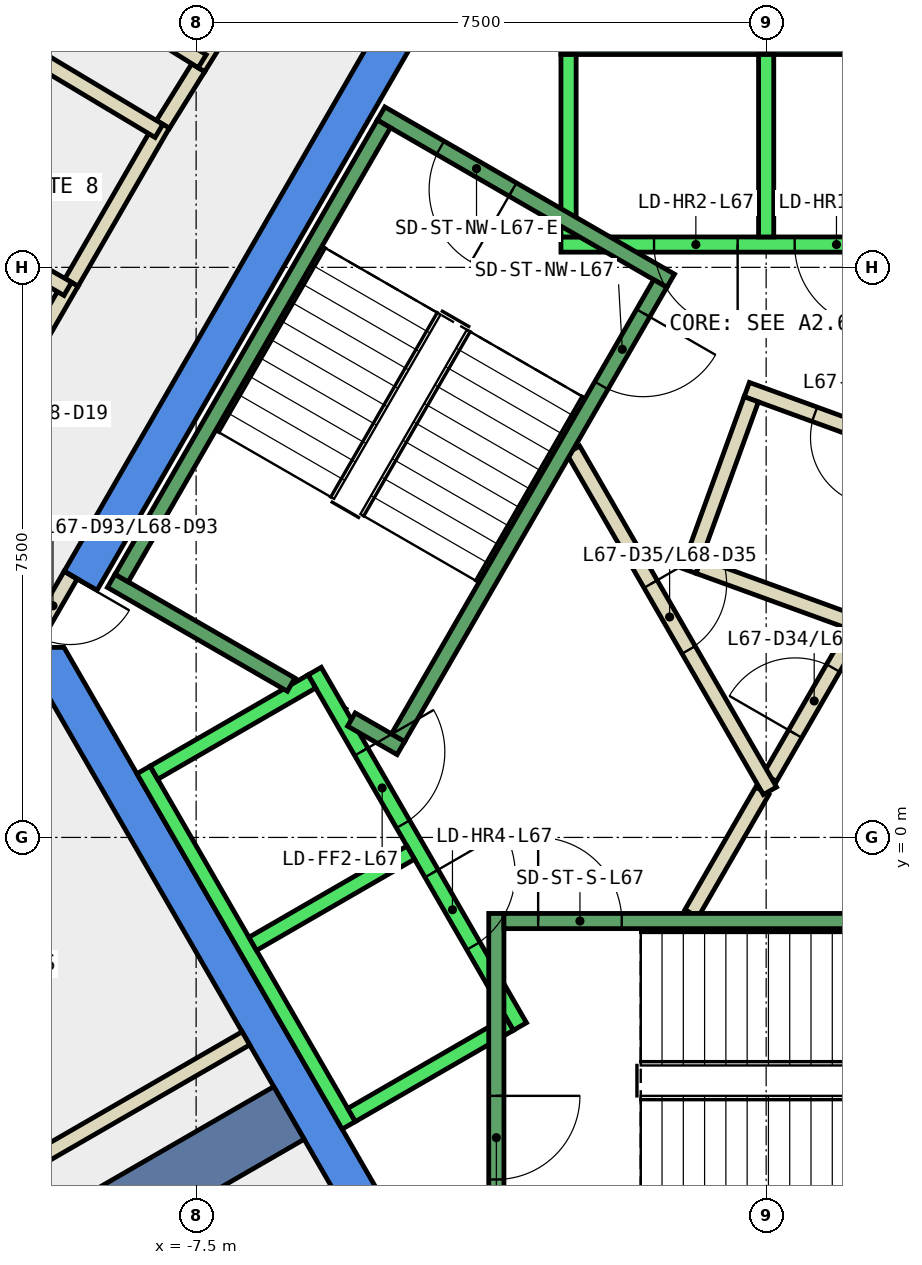
"""IFC4 building model, lengths in metres.
Left out: names, types, materials, properties, quantities, classifications, styles, units other than length and angle.
Written with IfcOpenShell. Run it as: python <this file> out.ifc"""

import sys

from ifc_helpers import new_model, si_unit, direction, frame, frame_2d, origin, place, context, subcontext, project, spatial, polyline, rectangle, outline, extrude, element, fill, save


model = new_model("IFC4")
c1 = context("Model", 3, precision=1e-05, world=origin(), true_north=direction((0.0, 1.0)))
c2 = subcontext(c1, "Body", "Model", "MODEL_VIEW")
j1 = project(units=[si_unit("LENGTHUNIT", "METRE"), si_unit("PLANEANGLEUNIT", "RADIAN")], contexts=[c1])
p1 = place(None, origin())
s1 = spatial("IfcSite", under=j1, at=p1, CompositionType="ELEMENT")
p2 = place(p1, origin())
s2 = spatial("IfcBuilding", under=s1, at=p2, CompositionType="ELEMENT")
p3 = place(p2, frame((0.0, 0.0, 290.0)))
s3 = spatial("IfcBuildingStorey", under=s2, at=p3, CompositionType="ELEMENT", Elevation=290.0)
p4 = place(p3, frame((0.0, 0.0, -0.34)))
e1 = element("IfcWall", 1, at=p4, inside=s3, PredefinedType="SHEAR", context=c2, shape_type="SweptSolid", body=[
    extrude(outline(polyline([(-9.236, 3.502), (-8.803, 3.253), (-4.619, 10.5), (-4.907, 11.0), (-9.236, 3.502)])), origin(), (0.0, 0.0, 1.0), 3.6),
])
p5 = place(p3, frame((0.0, 0.0, -0.34)))
e2 = element("IfcWall", 2, at=p5, inside=s3, PredefinedType="SHEAR", context=c2, shape_type="SweptSolid", body=[
    extrude(outline(polyline([(-9.815, 2.5), (-4.907, -6.0), (-4.619, -5.5), (-9.238, 2.5), (-9.815, 2.5)])), origin(), (0.0, 0.0, 1.0), 3.6),
])
p6 = place(p3, frame((-6.279, -3.625, -0.34), z_axis=(0.0, 0.0, 1.0), x_axis=(-0.866017533419, -0.500013631625, 0.0)))
e3 = element("IfcWall", 3, at=p6, inside=s3, PredefinedType="SHEAR", context=c2, shape_type="SweptSolid", body=[
    extrude(rectangle(XDim=9.0, YDim=0.8, at=frame_2d((4.5, 0.0))), origin(), (0.0, 0.0, 1.0), 3.6),
])
p7 = place(p3, frame((2.376, 4.934, 0.0), z_axis=(0.0, 0.0, 1.0), x_axis=(-0.939640574808, 0.342163104635, 0.0)))
e4 = element("IfcWall", 4, at=p7, inside=s3, PredefinedType="PARTITIONING", context=c2, shape_type="SweptSolid", body=[
    extrude(rectangle(XDim=2.8, YDim=0.2, at=frame_2d((1.4, 0.0))), origin(), (0.0, 0.0, 1.0), 3.26),
])
p8 = place(p7, frame((0.95, 0.0, 0.0)))
e5 = element("IfcOpeningElement", 5, at=p8, cuts=e4, PredefinedType="OPENING", context=c2, shape_type="SweptSolid", body=[
    extrude(rectangle(XDim=0.9, YDim=2.1, at=frame_2d((0.45, 1.05))), frame((0.0, 0.11, 0.0), z_axis=(0.0, -1.0, 0.0), x_axis=(1.0, 0.0, 0.0)), (0.0, 0.0, 1.0), 0.22),
])
p9 = place(p3, frame((-0.196, 5.764, 0.0), z_axis=(0.0, 0.0, 1.0), x_axis=(-0.34165322761, -0.939826086073, 0.0)))
e6 = element("IfcWall", 6, at=p9, inside=s3, PredefinedType="PARTITIONING", context=c2, shape_type="SweptSolid", body=[
    extrude(rectangle(XDim=2.4, YDim=0.2, at=frame_2d((1.2, 0.0))), origin(), (0.0, 0.0, 1.0), 3.26),
])
p10 = place(p3, frame((-0.888, 3.568, 0.0), z_axis=(0.0, 0.0, 1.0), x_axis=(0.939685034098, -0.34204098686, 0.0)))
e7 = element("IfcWall", 7, at=p10, inside=s3, PredefinedType="PARTITIONING", context=c2, shape_type="SweptSolid", body=[
    extrude(rectangle(XDim=2.237, YDim=0.2, at=frame_2d((1.119, 0.0))), origin(), (0.0, 0.0, 1.0), 3.26),
])
p11 = place(p3, frame((-7.937, 9.38, 0.0), z_axis=(0.0, 0.0, 1.0), x_axis=(0.52850186976, 0.848932137252, 0.0)))
e8 = element("IfcWall", 8, at=p11, inside=s3, PredefinedType="PARTITIONING", context=c2, shape_type="SweptSolid", body=[
    extrude(rectangle(XDim=0.88, YDim=0.2, at=frame_2d((0.44, 0.0))), origin(), (0.0, 0.0, 1.0), 3.26),
])
p12 = place(p3, frame((-7.472, 10.127, 0.0), z_axis=(0.0, 0.0, 1.0), x_axis=(0.527707224705, 0.849426326996, 0.0)))
e9 = element("IfcWall", 9, at=p12, inside=s3, PredefinedType="PARTITIONING", context=c2, shape_type="SweptSolid", body=[
    extrude(rectangle(XDim=3.0, YDim=0.2, at=frame_2d((1.5, 0.0))), origin(), (0.0, 0.0, 1.0), 3.26),
])
p13 = place(p3, frame((-12.082, 2.207, 0.0), z_axis=(0.0, 0.0, 1.0), x_axis=(0.500123454404, 0.865954115618, 0.0)))
e10 = element("IfcWall", 10, at=p13, inside=s3, PredefinedType="PARTITIONING", context=c2, shape_type="SweptSolid", body=[
    extrude(rectangle(XDim=5.885, YDim=0.2, at=frame_2d((2.942, 0.0))), origin(), (0.0, 0.0, 1.0), 3.26),
])
p14 = place(p13, frame((2.493, 0.0, 0.0)))
e11 = element("IfcOpeningElement", 11, at=p14, cuts=e10, PredefinedType="OPENING", context=c2, shape_type="SweptSolid", body=[
    extrude(rectangle(XDim=1.0, YDim=2.1, at=frame_2d((0.5, 1.05))), frame((0.0, 0.11, 0.0), z_axis=(0.0, -1.0, 0.0), x_axis=(1.0, 0.0, 0.0)), (0.0, 0.0, 1.0), 0.22),
])
p15 = place(p3, frame((-9.139, 7.303, 0.0), z_axis=(0.0, 0.0, 1.0), x_axis=(0.499869187296, 0.866100915363, 0.0)))
e12 = element("IfcWall", 12, at=p15, inside=s3, PredefinedType="PARTITIONING", context=c2, shape_type="SweptSolid", body=[
    extrude(rectangle(XDim=2.401, YDim=0.2, at=frame_2d((1.2, 0.0))), origin(), (0.0, 0.0, 1.0), 3.26),
])
p16 = place(p3, frame((-0.982, -1.0, 0.0), z_axis=(0.0, 0.0, 1.0), x_axis=(0.50024047865, 0.865886518847, 0.0)))
e13 = element("IfcWall", 13, at=p16, inside=s3, PredefinedType="PARTITIONING", context=c2, shape_type="SweptSolid", body=[
    extrude(rectangle(XDim=1.863, YDim=0.2, at=frame_2d((0.931, 0.0))), origin(), (0.0, 0.0, 1.0), 3.26),
])
p17 = place(p3, frame((0.05, 0.787, 0.0), z_axis=(0.0, 0.0, 1.0), x_axis=(0.499945861543, 0.866056658381, 0.0)))
e14 = element("IfcWall", 14, at=p17, inside=s3, PredefinedType="PARTITIONING", context=c2, shape_type="SweptSolid", body=[
    extrude(rectangle(XDim=2.428, YDim=0.2, at=frame_2d((1.214, 0.0))), origin(), (0.0, 0.0, 1.0), 3.26),
])
p18 = place(p17, frame((0.664, 0.0, 0.0)))
e15 = element("IfcOpeningElement", 15, at=p18, cuts=e14, PredefinedType="OPENING", context=c2, shape_type="SweptSolid", body=[
    extrude(rectangle(XDim=1.0, YDim=2.1, at=frame_2d((0.5, 1.05))), frame((0.0, 0.11, 0.0), z_axis=(0.0, -1.0, 0.0), x_axis=(1.0, 0.0, 0.0)), (0.0, 0.0, 1.0), 0.22),
])
p19 = place(p3, frame((-2.54, 5.1, 0.0), z_axis=(0.0, 0.0, 1.0), x_axis=(0.499925051871, -0.866068670783, 0.0)))
e16 = element("IfcWall", 16, at=p19, inside=s3, PredefinedType="PARTITIONING", context=c2, shape_type="SweptSolid", body=[
    extrude(rectangle(XDim=5.181, YDim=0.2, at=frame_2d((2.59, 0.0))), origin(), (0.0, 0.0, 1.0), 3.26),
])
p20 = place(p19, frame((2.04, 0.0, 0.0)))
e17 = element("IfcOpeningElement", 17, at=p20, cuts=e16, PredefinedType="OPENING", context=c2, shape_type="SweptSolid", body=[
    extrude(rectangle(XDim=1.0, YDim=2.1, at=frame_2d((0.5, 1.05))), frame((0.0, 0.11, 0.0), z_axis=(0.0, -1.0, 0.0), x_axis=(1.0, 0.0, 0.0)), (0.0, 0.0, 1.0), 0.22),
])
p21 = place(p3, frame((-6.845, -2.643, 0.0), z_axis=(0.0, 0.0, 1.0), x_axis=(-0.865994457699, -0.500053596362, 0.0)))
e18 = element("IfcWall", 18, at=p21, inside=s3, PredefinedType="PARTITIONING", context=c2, shape_type="SweptSolid", body=[
    extrude(rectangle(XDim=6.701, YDim=0.2, at=frame_2d((3.351, 0.0))), origin(), (0.0, 0.0, 1.0), 3.26),
])
p22 = place(p3, frame((-9.543, 11.531, 0.0), z_axis=(0.0, 0.0, 1.0), x_axis=(0.849400119549, -0.527749407305, 0.0)))
e19 = element("IfcWall", 19, at=p22, inside=s3, PredefinedType="PARTITIONING", context=c2, shape_type="SweptSolid", body=[
    extrude(rectangle(XDim=2.5, YDim=0.2, at=frame_2d((1.25, 0.0))), origin(), (0.0, 0.0, 1.0), 3.26),
])
for number, where, z_axis, x_axis in (
    (20, (-7.989, 9.295, 0.0), (0.0, 0.0, 1.0), (-0.858, 0.514, 0.0)),
    (21, (-11.181, 8.367, 0.0), (0.0, 0.0, 1.0), (0.866, -0.5, 0.0)),
):
    element("IfcWall", number, at=place(p3, frame(where, z_axis=z_axis, x_axis=x_axis)), inside=s3, PredefinedType="PARTITIONING", context=c2, shape_type="SweptSolid", body=[
        extrude(rectangle(XDim=2.3, YDim=0.2, at=frame_2d((1.15, 0.0))), origin(), (0.0, 0.0, 1.0), 3.26),
    ])
p23 = place(p3, frame((-9.15, 3.452, 0.0), z_axis=(0.0, 0.0, 1.0), x_axis=(-0.500079945886, -0.865979242085, 0.0)))
e22 = element("IfcWall", 22, at=p23, inside=s3, PredefinedType="PARTITIONING", context=c2, shape_type="SweptSolid", body=[
    extrude(rectangle(XDim=0.926, YDim=0.2, at=frame_2d((0.463, 0.0))), origin(), (0.0, 0.0, 1.0), 2.4),
])
p24 = place(p23, frame((0.017, 0.0, 0.0)))
e23 = element("IfcOpeningElement", 23, at=p24, cuts=e22, PredefinedType="OPENING", context=c2, shape_type="SweptSolid", body=[
    extrude(rectangle(XDim=0.9, YDim=2.1, at=frame_2d((0.45, 1.05))), frame((0.0, 0.11, 0.0), z_axis=(0.0, -1.0, 0.0), x_axis=(1.0, 0.0, 0.0)), (0.0, 0.0, 1.0), 0.22),
])
p25 = place(p3, frame((2.7, 7.8, 0.0), z_axis=(0.0, 0.0, 1.0), x_axis=(-1.0, 0.0, 0.0)))
e24 = element("IfcWall", 24, at=p25, inside=s3, PredefinedType="STANDARD", context=c2, shape_type="SweptSolid", body=[
    extrude(rectangle(XDim=5.4, YDim=0.2, at=frame_2d((2.7, 0.0))), origin(), (0.0, 0.0, 1.0), 3.26),
])
p26 = place(p25, frame((1.225, 0.0, 0.0)))
e25 = element("IfcOpeningElement", 25, at=p26, cuts=e24, PredefinedType="OPENING", context=c2, shape_type="SweptSolid", body=[
    extrude(rectangle(XDim=1.1, YDim=2.1, at=frame_2d((0.55, 1.05))), frame((0.0, 0.11, 0.0), z_axis=(0.0, -1.0, 0.0), x_axis=(1.0, 0.0, 0.0)), (0.0, 0.0, 1.0), 0.22),
])
p27 = place(p25, frame((3.075, 0.0, 0.0)))
e26 = element("IfcOpeningElement", 26, at=p27, cuts=e24, PredefinedType="OPENING", context=c2, shape_type="SweptSolid", body=[
    extrude(rectangle(XDim=1.1, YDim=2.1, at=frame_2d((0.55, 1.05))), frame((0.0, 0.11, 0.0), z_axis=(0.0, -1.0, 0.0), x_axis=(1.0, 0.0, 0.0)), (0.0, 0.0, 1.0), 0.22),
])
p28 = place(p3, frame((2.7, 10.4, 0.0), z_axis=(0.0, 0.0, 1.0), x_axis=(-1.0, 0.0, 0.0)))
e27 = element("IfcWall", 27, at=p28, inside=s3, PredefinedType="STANDARD", context=c2, shape_type="SweptSolid", body=[
    extrude(rectangle(XDim=5.4, YDim=0.2, at=frame_2d((2.7, 0.0))), origin(), (0.0, 0.0, 1.0), 3.26),
])
for number, where, z_axis, x_axis in (
    (28, (0.0, 7.9, 0.0), (0.0, 0.0, 1.0), (0.0, 1.0, 0.0)),
    (29, (-2.6, 7.9, 0.0), (0.0, 0.0, 1.0), (0.0, 1.0, 0.0)),
):
    element("IfcWall", number, at=place(p3, frame(where, z_axis=z_axis, x_axis=x_axis)), inside=s3, PredefinedType="STANDARD", context=c2, shape_type="SweptSolid", body=[
        extrude(rectangle(XDim=2.4, YDim=0.2, at=frame_2d((1.2, 0.0))), origin(), (0.0, 0.0, 1.0), 3.26),
    ])
p29 = place(p3, frame((-5.94, 2.188, 0.0), z_axis=(0.0, 0.0, 1.0), x_axis=(0.500034260056, -0.866005622828, 0.0)))
e30 = element("IfcWall", 30, at=p29, inside=s3, PredefinedType="STANDARD", context=c2, shape_type="SweptSolid", body=[
    extrude(rectangle(XDim=5.399, YDim=0.2, at=frame_2d((2.7, 0.0))), origin(), (0.0, 0.0, 1.0), 3.26),
])
p30 = place(p29, frame((3.075, 0.0, 0.0)))
e31 = element("IfcOpeningElement", 31, at=p30, cuts=e30, PredefinedType="OPENING", context=c2, shape_type="SweptSolid", body=[
    extrude(rectangle(XDim=1.1, YDim=2.1, at=frame_2d((0.55, 1.05))), frame((0.0, 0.11, 0.0), z_axis=(0.0, -1.0, 0.0), x_axis=(1.0, 0.0, 0.0)), (0.0, 0.0, 1.0), 0.22),
])
p31 = place(p29, frame((1.225, 0.0, 0.0)))
e32 = element("IfcOpeningElement", 32, at=p31, cuts=e30, PredefinedType="OPENING", context=c2, shape_type="SweptSolid", body=[
    extrude(rectangle(XDim=1.1, YDim=2.1, at=frame_2d((0.55, 1.05))), frame((0.0, 0.11, 0.0), z_axis=(0.0, -1.0, 0.0), x_axis=(1.0, 0.0, 0.0)), (0.0, 0.0, 1.0), 0.22),
])
p32 = place(p3, frame((-8.192, 0.888, 0.0), z_axis=(0.0, 0.0, 1.0), x_axis=(0.500034260056, -0.866005622828, 0.0)))
e33 = element("IfcWall", 33, at=p32, inside=s3, PredefinedType="STANDARD", context=c2, shape_type="SweptSolid", body=[
    extrude(rectangle(XDim=5.399, YDim=0.2, at=frame_2d((2.7, 0.0))), origin(), (0.0, 0.0, 1.0), 3.26),
])
for number, where, z_axis, x_axis in (
    (34, (-5.977, 2.052, 0.0), (0.0, 0.0, 1.0), (-0.866, -0.5, 0.0)),
    (35, (-4.677, -0.2, 0.0), (0.0, 0.0, 1.0), (-0.866, -0.5, 0.0)),
):
    element("IfcWall", number, at=place(p3, frame(where, z_axis=z_axis, x_axis=x_axis)), inside=s3, PredefinedType="STANDARD", context=c2, shape_type="SweptSolid", body=[
        extrude(rectangle(XDim=2.399, YDim=0.2, at=frame_2d((1.2, 0.0))), origin(), (0.0, 0.0, 1.0), 3.26),
    ])
p33 = place(p3, frame((-3.377, -2.452, 0.0), z_axis=(0.0, 0.0, 1.0), x_axis=(-0.865955154139, -0.50012165622, 0.0)))
e36 = element("IfcWall", 36, at=p33, inside=s3, PredefinedType="STANDARD", context=c2, shape_type="SweptSolid", body=[
    extrude(rectangle(XDim=2.4, YDim=0.2, at=frame_2d((1.2, 0.0))), origin(), (0.0, 0.0, 1.0), 3.26),
])
p34 = place(p3, frame((-3.55, -1.0, 0.0), z_axis=(0.0, 0.0, 1.0), x_axis=(0.0, -1.0, 0.0)))
e37 = element("IfcWall", 37, at=p34, inside=s3, PredefinedType="STANDARD", context=c2, shape_type="SweptSolid", body=[
    extrude(rectangle(XDim=4.4, YDim=0.2, at=frame_2d((2.2, 0.0))), origin(), (0.0, 0.0, 1.0), 3.26),
])
p35 = place(p34, frame((2.4, 0.0, 0.0)))
e38 = element("IfcOpeningElement", 38, at=p35, cuts=e37, PredefinedType="OPENING", context=c2, shape_type="SweptSolid", body=[
    extrude(rectangle(XDim=1.1, YDim=2.2, at=frame_2d((0.55, 1.1))), frame((0.0, 0.11, 0.0), z_axis=(0.0, -1.0, 0.0), x_axis=(1.0, 0.0, 0.0)), (0.0, 0.0, 1.0), 0.22),
])
p36 = place(p3, frame((-3.45, -1.1, 0.0), z_axis=(0.0, 0.0, 1.0), x_axis=(1.0, 0.0, 0.0)))
e39 = element("IfcWall", 39, at=p36, inside=s3, PredefinedType="STANDARD", context=c2, shape_type="SweptSolid", body=[
    extrude(rectangle(XDim=6.9, YDim=0.2, at=frame_2d((3.45, 0.0))), origin(), (0.0, 0.0, 1.0), 3.26),
])
p37 = place(p36, frame((0.45, 0.0, 0.0)))
e40 = element("IfcOpeningElement", 40, at=p37, cuts=e39, PredefinedType="OPENING", context=c2, shape_type="SweptSolid", body=[
    extrude(rectangle(XDim=1.1, YDim=2.2, at=frame_2d((0.55, 1.1))), frame((0.0, 0.11, 0.0), z_axis=(0.0, -1.0, 0.0), x_axis=(1.0, 0.0, 0.0)), (0.0, 0.0, 1.0), 0.22),
])
p38 = place(p3, frame((-1.256, 7.324, 0.0), z_axis=(0.0, 0.0, 1.0), x_axis=(-0.866046073146, 0.499964197906, 0.0)))
e41 = element("IfcWall", 41, at=p38, inside=s3, PredefinedType="STANDARD", context=c2, shape_type="SweptSolid", body=[
    extrude(rectangle(XDim=4.4, YDim=0.2, at=frame_2d((2.2, 0.0))), origin(), (0.0, 0.0, 1.0), 3.26),
])
p39 = place(p38, frame((2.4, 0.0, 0.0)))
e42 = element("IfcOpeningElement", 42, at=p39, cuts=e41, PredefinedType="OPENING", context=c2, shape_type="SweptSolid", body=[
    extrude(rectangle(XDim=1.1, YDim=2.2, at=frame_2d((0.55, 1.1))), frame((0.0, 0.11, 0.0), z_axis=(0.0, -1.0, 0.0), x_axis=(1.0, 0.0, 0.0)), (0.0, 0.0, 1.0), 0.22),
])
p40 = place(p3, frame((-6.25, 2.01, 0.0), z_axis=(0.0, 0.0, 1.0), x_axis=(-0.86611865017, 0.499838457731, 0.0)))
e43 = element("IfcWall", 43, at=p40, inside=s3, PredefinedType="STANDARD", context=c2, shape_type="SweptSolid", body=[
    extrude(rectangle(XDim=2.733, YDim=0.2, at=frame_2d((1.366, 0.0))), origin(), (0.0, 0.0, 1.0), 3.26),
])
p41 = place(p3, frame((-4.806, 1.176, 0.0), z_axis=(0.0, 0.0, 1.0), x_axis=(-0.866558586415, 0.499075361355, 0.0)))
e44 = element("IfcWall", 44, at=p41, inside=s3, PredefinedType="STANDARD", context=c2, shape_type="SweptSolid", body=[
    extrude(rectangle(XDim=0.751, YDim=0.2, at=frame_2d((0.376, 0.0))), origin(), (0.0, 0.0, 1.0), 3.26),
])
p42 = place(p3, frame((-1.393, 7.288, 0.0), z_axis=(0.0, 0.0, 1.0), x_axis=(-0.499963383562, -0.866046543262, 0.0)))
e45 = element("IfcWall", 45, at=p42, inside=s3, PredefinedType="STANDARD", context=c2, shape_type="SweptSolid", body=[
    extrude(rectangle(XDim=6.9, YDim=0.2, at=frame_2d((3.45, 0.0))), origin(), (0.0, 0.0, 1.0), 3.26),
])
p43 = place(p42, frame((0.45, 0.0, 0.0)))
e46 = element("IfcOpeningElement", 46, at=p43, cuts=e45, PredefinedType="OPENING", context=c2, shape_type="SweptSolid", body=[
    extrude(rectangle(XDim=1.1, YDim=2.2, at=frame_2d((0.55, 1.1))), frame((0.0, 0.11, 0.0), z_axis=(0.0, -1.0, 0.0), x_axis=(1.0, 0.0, 0.0)), (0.0, 0.0, 1.0), 0.22),
])
p44 = place(p3, frame((-5.03, 9.388, 0.0), z_axis=(0.0, 0.0, 1.0), x_axis=(-0.499978703459, -0.866037698999, 0.0)))
e47 = element("IfcWall", 47, at=p44, inside=s3, PredefinedType="STANDARD", context=c2, shape_type="SweptSolid", body=[
    extrude(rectangle(XDim=6.9, YDim=0.2, at=frame_2d((3.45, 0.0))), origin(), (0.0, 0.0, 1.0), 3.26),
])
p45 = place(p18, origin())
e48 = element("IfcDoor", 48, at=p45, inside=s3, OperationType="SINGLE_SWING_RIGHT", PredefinedType="DOOR", context=c2, shape_type="SweptSolid", body=[
    extrude(rectangle(XDim=1.0, YDim=2.1, at=frame_2d((0.5, 1.05))), frame((0.0, 0.025, 0.0), z_axis=(0.0, -1.0, 0.0), x_axis=(1.0, 0.0, 0.0)), (0.0, 0.0, 1.0), 0.05),
])
fill(e15, e48)
p46 = place(p20, origin())
e49 = element("IfcDoor", 49, at=p46, inside=s3, OperationType="SINGLE_SWING_RIGHT", PredefinedType="DOOR", context=c2, shape_type="SweptSolid", body=[
    extrude(rectangle(XDim=1.0, YDim=2.1, at=frame_2d((0.5, 1.05))), frame((0.0, 0.025, 0.0), z_axis=(0.0, -1.0, 0.0), x_axis=(1.0, 0.0, 0.0)), (0.0, 0.0, 1.0), 0.05),
])
fill(e17, e49)
p47 = place(p8, origin())
e50 = element("IfcDoor", 50, at=p47, inside=s3, OperationType="SINGLE_SWING_LEFT", PredefinedType="DOOR", context=c2, shape_type="SweptSolid", body=[
    extrude(rectangle(XDim=0.9, YDim=2.1, at=frame_2d((0.45, 1.05))), frame((0.0, 0.025, 0.0), z_axis=(0.0, -1.0, 0.0), x_axis=(1.0, 0.0, 0.0)), (0.0, 0.0, 1.0), 0.05),
])
fill(e5, e50)
p48 = place(p24, origin())
e51 = element("IfcDoor", 51, at=p48, inside=s3, OperationType="SINGLE_SWING_LEFT", PredefinedType="DOOR", context=c2, shape_type="SweptSolid", body=[
    extrude(rectangle(XDim=0.9, YDim=2.1, at=frame_2d((0.45, 1.05))), frame((0.0, 0.025, 0.0), z_axis=(0.0, -1.0, 0.0), x_axis=(1.0, 0.0, 0.0)), (0.0, 0.0, 1.0), 0.05),
])
fill(e23, e51)
p49 = place(p26, origin())
e52 = element("IfcDoor", 52, at=p49, inside=s3, OperationType="SLIDING_TO_LEFT", PredefinedType="DOOR", context=c2, shape_type="SweptSolid", body=[
    extrude(rectangle(XDim=1.1, YDim=2.1, at=frame_2d((0.55, 1.05))), frame((0.0, 0.025, 0.0), z_axis=(0.0, -1.0, 0.0), x_axis=(1.0, 0.0, 0.0)), (0.0, 0.0, 1.0), 0.05),
])
fill(e25, e52)
p50 = place(p27, origin())
e53 = element("IfcDoor", 53, at=p50, inside=s3, OperationType="SLIDING_TO_LEFT", PredefinedType="DOOR", context=c2, shape_type="SweptSolid", body=[
    extrude(rectangle(XDim=1.1, YDim=2.1, at=frame_2d((0.55, 1.05))), frame((0.0, 0.025, 0.0), z_axis=(0.0, -1.0, 0.0), x_axis=(1.0, 0.0, 0.0)), (0.0, 0.0, 1.0), 0.05),
])
fill(e26, e53)
p51 = place(p30, origin())
e54 = element("IfcDoor", 54, at=p51, inside=s3, OperationType="SLIDING_TO_LEFT", PredefinedType="DOOR", context=c2, shape_type="SweptSolid", body=[
    extrude(rectangle(XDim=1.1, YDim=2.1, at=frame_2d((0.55, 1.05))), frame((0.0, 0.025, 0.0), z_axis=(0.0, -1.0, 0.0), x_axis=(1.0, 0.0, 0.0)), (0.0, 0.0, 1.0), 0.05),
])
fill(e31, e54)
p52 = place(p31, origin())
e55 = element("IfcDoor", 55, at=p52, inside=s3, OperationType="SLIDING_TO_LEFT", PredefinedType="DOOR", context=c2, shape_type="SweptSolid", body=[
    extrude(rectangle(XDim=1.1, YDim=2.1, at=frame_2d((0.55, 1.05))), frame((0.0, 0.025, 0.0), z_axis=(0.0, -1.0, 0.0), x_axis=(1.0, 0.0, 0.0)), (0.0, 0.0, 1.0), 0.05),
])
fill(e32, e55)
p53 = place(p37, origin())
e56 = element("IfcDoor", 56, at=p53, inside=s3, OperationType="SINGLE_SWING_LEFT", PredefinedType="DOOR", context=c2, shape_type="SweptSolid", body=[
    extrude(rectangle(XDim=1.1, YDim=2.2, at=frame_2d((0.55, 1.1))), frame((0.0, 0.025, 0.0), z_axis=(0.0, -1.0, 0.0), x_axis=(1.0, 0.0, 0.0)), (0.0, 0.0, 1.0), 0.05),
])
fill(e40, e56)
p54 = place(p35, origin())
e57 = element("IfcDoor", 57, at=p54, inside=s3, OperationType="SINGLE_SWING_LEFT", PredefinedType="DOOR", context=c2, shape_type="SweptSolid", body=[
    extrude(rectangle(XDim=1.1, YDim=2.2, at=frame_2d((0.55, 1.1))), frame((0.0, 0.025, 0.0), z_axis=(0.0, -1.0, 0.0), x_axis=(1.0, 0.0, 0.0)), (0.0, 0.0, 1.0), 0.05),
])
fill(e38, e57)
p55 = place(p43, origin())
e58 = element("IfcDoor", 58, at=p55, inside=s3, OperationType="SINGLE_SWING_LEFT", PredefinedType="DOOR", context=c2, shape_type="SweptSolid", body=[
    extrude(rectangle(XDim=1.1, YDim=2.2, at=frame_2d((0.55, 1.1))), frame((0.0, 0.025, 0.0), z_axis=(0.0, -1.0, 0.0), x_axis=(1.0, 0.0, 0.0)), (0.0, 0.0, 1.0), 0.05),
])
fill(e46, e58)
p56 = place(p39, origin())
e59 = element("IfcDoor", 59, at=p56, inside=s3, OperationType="SINGLE_SWING_LEFT", PredefinedType="DOOR", context=c2, shape_type="SweptSolid", body=[
    extrude(rectangle(XDim=1.1, YDim=2.2, at=frame_2d((0.55, 1.1))), frame((0.0, 0.025, 0.0), z_axis=(0.0, -1.0, 0.0), x_axis=(1.0, 0.0, 0.0)), (0.0, 0.0, 1.0), 0.05),
])
fill(e42, e59)
save(model, sys.argv[1])
